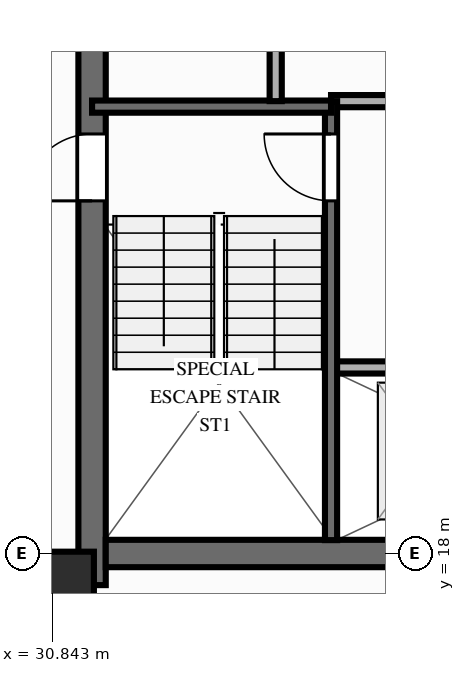
"""IFC4 building model, lengths in metres.
Left out: names, types, materials, properties, quantities, classifications, styles, units other than length and angle.
Written with IfcOpenShell. Run it as: python <this file> out.ifc"""

import sys

from ifc_helpers import new_model, si_unit, direction, frame, frame_2d, origin, origin_2d, place, context, subcontext, project, spatial, rectangle, extrude, source, transform, mapped, element, fill, save


model = new_model("IFC4")
c1 = context("Model", 3, precision=1e-05, world=origin(), true_north=direction((0.0, 1.0)))
c2 = subcontext(c1, "Body", "Model", "MODEL_VIEW")
j1 = project(units=[si_unit("LENGTHUNIT", "METRE"), si_unit("PLANEANGLEUNIT", "RADIAN")], contexts=[c1])
p1 = place(None, origin())
s1 = spatial("IfcSite", under=j1, at=p1, CompositionType="ELEMENT")
p2 = place(p1, origin())
s2 = spatial("IfcBuilding", under=s1, at=p2, CompositionType="ELEMENT")
p3 = place(p2, frame((0.0, 0.0, 148.7)))
s3 = spatial("IfcBuildingStorey", under=s2, at=p3, CompositionType="ELEMENT", Elevation=148.7)
p4 = place(p3, frame((31.5, 17.48, 0.0), z_axis=(0.0, 0.0, 1.0), x_axis=(0.0, 1.0, 0.0)))
e1 = element("IfcWall", 1, at=p4, inside=s3, PredefinedType="SHEAR", context=c2, shape_type="SweptSolid", body=[
    extrude(rectangle(XDim=19.04, YDim=0.45, at=frame_2d((9.52, 0.0))), origin(), (0.0, 0.0, 1.0), 3.5),
])
p5 = place(p4, frame((6.32, 0.0, 0.0)))
e2 = element("IfcOpeningElement", 2, at=p5, cuts=e1, PredefinedType="OPENING", context=c2, shape_type="SweptSolid", body=[
    extrude(rectangle(XDim=1.1, YDim=2.15, at=frame_2d((0.55, 1.075))), frame((0.0, 0.237, 0.0), z_axis=(0.0, -1.0, 0.0), x_axis=(1.0, 0.0, 0.0)), (0.0, 0.0, 1.0), 0.474),
])
p6 = place(p3, frame((31.725, 18.0, 0.0), z_axis=(0.0, 0.0, 1.0), x_axis=(1.0, 0.0, 0.0)))
e3 = element("IfcWall", 3, at=p6, inside=s3, PredefinedType="SHEAR", context=c2, shape_type="SweptSolid", body=[
    extrude(rectangle(XDim=12.55, YDim=0.45, at=frame_2d((6.275, 0.0))), origin(), (0.0, 0.0, 1.0), 3.5),
])
m1 = source(origin(), c2, "Body", "SweptSolid", [
    extrude(rectangle(XDim=1.1, YDim=1.1, at=origin_2d()), origin(), (0.0, 0.0, 1.0), 3.5),
])
p7 = place(p3, frame((30.98, 17.48, 0.0), z_axis=(0.0, 0.0, 1.0), x_axis=(1.0, 0.0, 0.0)))
e4 = element("IfcColumn", 4, at=p7, inside=s3, PredefinedType="COLUMN", context=c2, shape_type="MappedRepresentation", body=[
    mapped(m1, transform((0.0, 0.0, 0.0), scale=1.0)),
])
p8 = place(p3, frame((35.43, 21.06, 0.0), z_axis=(0.0, 0.0, 1.0), x_axis=(1.0, 0.0, 0.0)))
e5 = element("IfcWall", 5, at=p8, inside=s3, PredefinedType="PARTITIONING", context=c2, shape_type="SweptSolid", body=[
    extrude(rectangle(XDim=6.02, YDim=0.2, at=frame_2d((3.01, 0.0))), origin(), (0.0, 0.0, 1.0), 3.16),
])
p9 = place(p8, frame((1.0, 0.0, 0.0)))
e6 = element("IfcOpeningElement", 6, at=p9, cuts=e5, PredefinedType="OPENING", context=c2, shape_type="SweptSolid", body=[
    extrude(rectangle(XDim=1.1, YDim=2.15, at=frame_2d((0.55, 1.075))), frame((0.0, 0.112, 0.0), z_axis=(0.0, -1.0, 0.0), x_axis=(1.0, 0.0, 0.0)), (0.0, 0.0, 1.0), 0.224),
])
p10 = place(p8, frame((2.95, 0.0, 0.0)))
e7 = element("IfcOpeningElement", 7, at=p10, cuts=e5, PredefinedType="OPENING", context=c2, shape_type="SweptSolid", body=[
    extrude(rectangle(XDim=1.1, YDim=2.15, at=frame_2d((0.55, 1.075))), frame((0.0, 0.112, 0.0), z_axis=(0.0, -1.0, 0.0), x_axis=(1.0, 0.0, 0.0)), (0.0, 0.0, 1.0), 0.224),
])
p11 = place(p8, frame((4.58, 0.0, 0.0)))
e8 = element("IfcOpeningElement", 8, at=p11, cuts=e5, PredefinedType="OPENING", context=c2, shape_type="SweptSolid", body=[
    extrude(rectangle(XDim=1.2, YDim=2.15, at=frame_2d((0.6, 1.075))), frame((0.0, 0.112, 0.0), z_axis=(0.0, -1.0, 0.0), x_axis=(1.0, 0.0, 0.0)), (0.0, 0.0, 1.0), 0.224),
])
p12 = place(p3, frame((35.43, 25.44, 0.0), z_axis=(0.0, 0.0, 1.0), x_axis=(1.0, 0.0, 0.0)))
e9 = element("IfcWall", 9, at=p12, inside=s3, PredefinedType="PARTITIONING", context=c2, shape_type="SweptSolid", body=[
    extrude(rectangle(XDim=4.72, YDim=0.2, at=frame_2d((2.36, 0.0))), origin(), (0.0, 0.0, 1.0), 3.16),
])
p13 = place(p12, frame((1.25, 0.0, 0.0)))
e10 = element("IfcOpeningElement", 10, at=p13, cuts=e9, PredefinedType="OPENING", context=c2, shape_type="SweptSolid", body=[
    extrude(rectangle(XDim=1.1, YDim=2.15, at=frame_2d((0.55, 1.075))), frame((0.0, 0.112, 0.0), z_axis=(0.0, -1.0, 0.0), x_axis=(1.0, 0.0, 0.0)), (0.0, 0.0, 1.0), 0.224),
])
p14 = place(p3, frame((35.43, 18.22, 0.0), z_axis=(0.0, 0.0, 1.0), x_axis=(0.0, 1.0, 0.0)))
e11 = element("IfcWall", 11, at=p14, inside=s3, PredefinedType="SOLIDWALL", context=c2, shape_type="SweptSolid", body=[
    extrude(rectangle(XDim=7.22, YDim=0.2, at=frame_2d((3.61, 0.0))), origin(), (0.0, 0.0, 1.0), 3.29),
])
p15 = place(p14, frame((6.68, 0.0, 0.0), z_axis=(0.0, 0.0, 1.0), x_axis=(-1.0, 0.0, 0.0)))
e12 = element("IfcOpeningElement", 12, at=p15, cuts=e11, PredefinedType="OPENING", context=c2, shape_type="SweptSolid", body=[
    extrude(rectangle(XDim=1.1, YDim=2.15, at=frame_2d((0.55, 1.075))), frame((0.0, 0.112, 0.0), z_axis=(0.0, -1.0, 0.0), x_axis=(1.0, 0.0, 0.0)), (0.0, 0.0, 1.0), 0.224),
])
p16 = place(p3, frame((31.5, 25.35, 0.0), z_axis=(0.0, 0.0, 1.0), x_axis=(1.0, 0.0, 0.0)))
e13 = element("IfcWall", 13, at=p16, inside=s3, PredefinedType="SOLIDWALL", context=c2, shape_type="SweptSolid", body=[
    extrude(rectangle(XDim=3.93, YDim=0.2, at=frame_2d((1.965, 0.0))), origin(), (0.0, 0.0, 1.0), 3.29),
])
p17 = place(p3, frame((34.52, 25.44, 0.0), z_axis=(0.0, 0.0, 1.0), x_axis=(0.0, 1.0, 0.0)))
e14 = element("IfcWall", 14, at=p17, inside=s3, PredefinedType="PARTITIONING", context=c2, shape_type="SweptSolid", body=[
    extrude(rectangle(XDim=10.34, YDim=0.2, at=frame_2d((5.17, 0.0))), origin(), (0.0, 0.0, 1.0), 3.16),
])
p18 = place(p17, frame((1.15, 0.0, 0.0)))
e15 = element("IfcOpeningElement", 15, at=p18, cuts=e14, PredefinedType="OPENING", context=c2, shape_type="SweptSolid", body=[
    extrude(rectangle(XDim=0.9, YDim=2.1, at=frame_2d((0.45, 1.05))), frame((0.0, 0.112, 0.0), z_axis=(0.0, -1.0, 0.0), x_axis=(1.0, 0.0, 0.0)), (0.0, 0.0, 1.0), 0.224),
])
p19 = place(p17, frame((4.35, 0.0, 0.0)))
e16 = element("IfcOpeningElement", 16, at=p19, cuts=e14, PredefinedType="OPENING", context=c2, shape_type="SweptSolid", body=[
    extrude(rectangle(XDim=0.9, YDim=2.1, at=frame_2d((0.45, 1.05))), frame((0.0, 0.112, 0.0), z_axis=(0.0, -1.0, 0.0), x_axis=(1.0, 0.0, 0.0)), (0.0, 0.0, 1.0), 0.224),
])
p20 = place(p17, frame((7.01, 0.0, 0.0)))
e17 = element("IfcOpeningElement", 17, at=p20, cuts=e14, PredefinedType="OPENING", context=c2, shape_type="SweptSolid", body=[
    extrude(rectangle(XDim=1.0, YDim=2.15, at=frame_2d((0.5, 1.075))), frame((0.0, 0.112, 0.0), z_axis=(0.0, -1.0, 0.0), x_axis=(1.0, 0.0, 0.0)), (0.0, 0.0, 1.0), 0.224),
])
p21 = place(p17, frame((8.76, 0.0, 0.0)))
e18 = element("IfcOpeningElement", 18, at=p21, cuts=e14, PredefinedType="OPENING", context=c2, shape_type="SweptSolid", body=[
    extrude(rectangle(XDim=1.0, YDim=2.15, at=frame_2d((0.5, 1.075))), frame((0.0, 0.112, 0.0), z_axis=(0.0, -1.0, 0.0), x_axis=(1.0, 0.0, 0.0)), (0.0, 0.0, 1.0), 0.224),
])
m2 = source(origin(), c2, "Body", "SweptSolid", [
    extrude(rectangle(XDim=1.1, YDim=2.15, at=frame_2d((0.55, 1.075))), frame((0.0, 0.025, 0.0), z_axis=(0.0, -1.0, 0.0), x_axis=(1.0, 0.0, 0.0)), (0.0, 0.0, 1.0), 0.05),
])
p22 = place(p5, origin())
e19 = element("IfcDoor", 19, at=p22, inside=s3, OperationType="SINGLE_SWING_LEFT", PredefinedType="DOOR", context=c2, shape_type="MappedRepresentation", body=[
    mapped(m2, transform((0.0, 0.0, 0.0), scale=1.0)),
])
fill(e2, e19)
p23 = place(p15, origin())
e20 = element("IfcDoor", 20, at=p23, inside=s3, OperationType="SINGLE_SWING_LEFT", PredefinedType="DOOR", context=c2, shape_type="MappedRepresentation", body=[
    mapped(m2, transform((0.0, 0.0, 0.0), scale=1.0)),
])
fill(e12, e20)
save(model, sys.argv[1])
